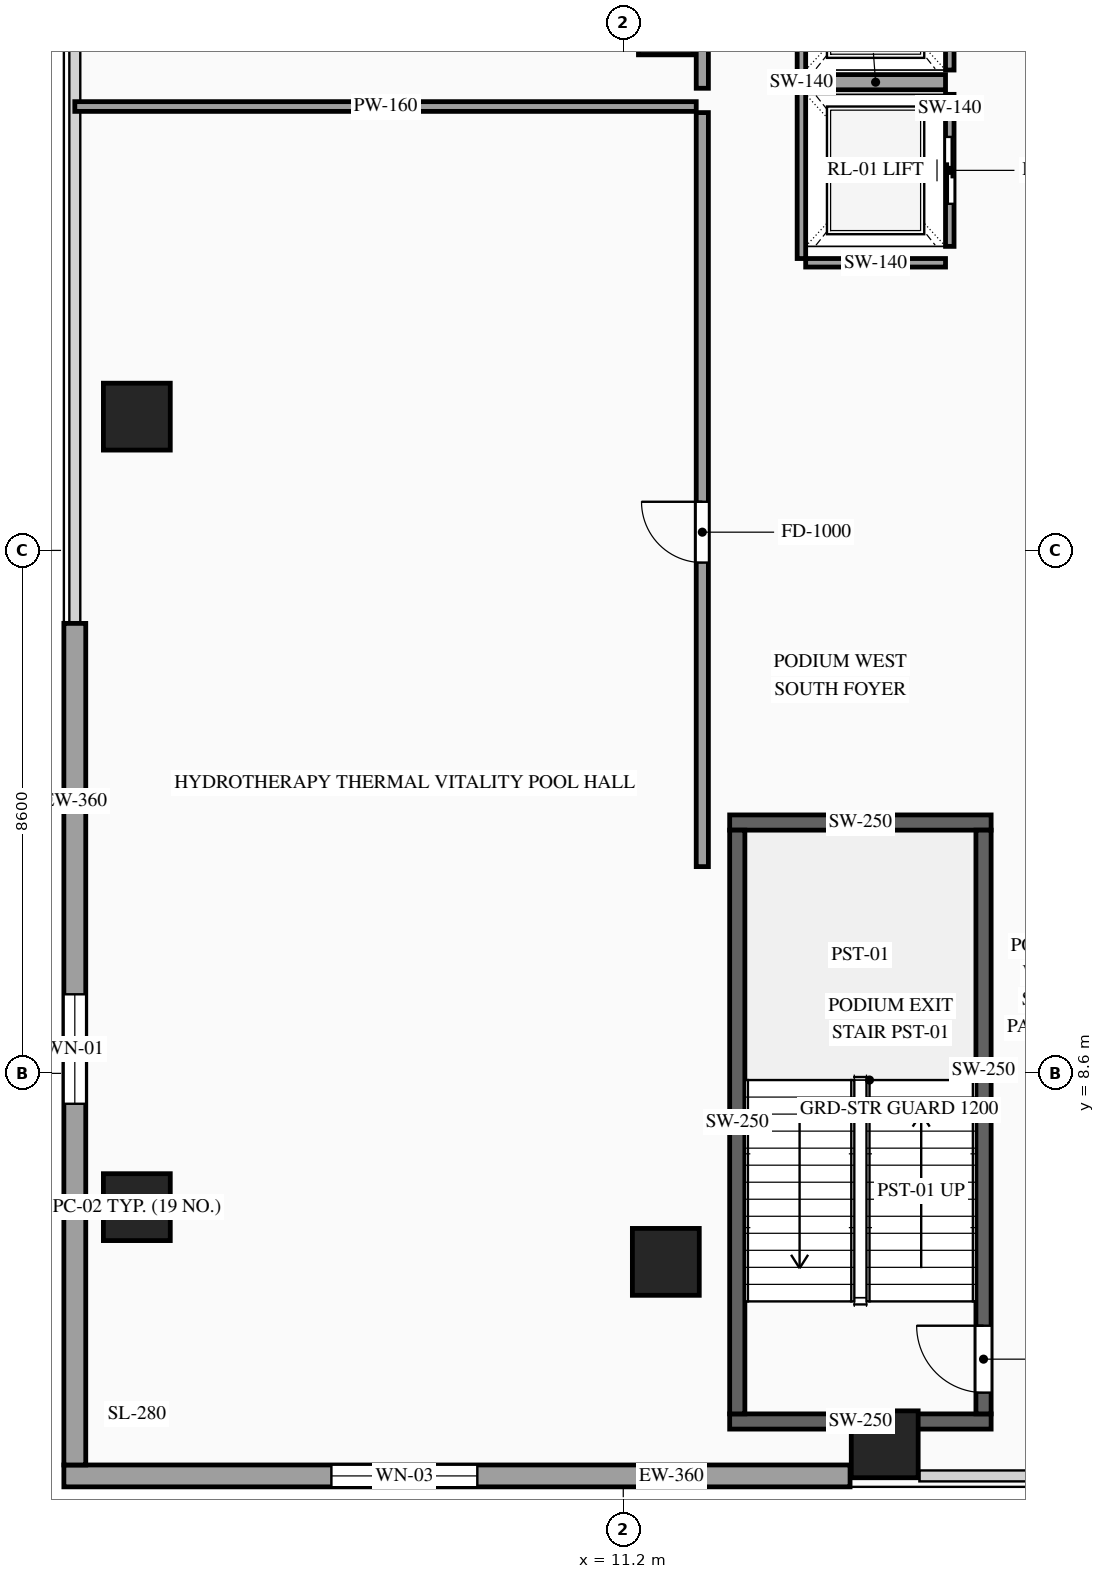
"""IFC4 building model, lengths in metres.
Left out: names, types, materials, properties, quantities, classifications, styles, units other than length and angle.
Written with IfcOpenShell. Run it as: python <this file> out.ifc"""

import sys

from ifc_helpers import new_model, si_unit, direction, frame, frame_2d, origin, origin_2d, place, context, subcontext, project, spatial, rectangle, extrude, source, transform, mapped, element, fill, save


model = new_model("IFC4")
c1 = context("Model", 3, precision=1e-05, world=origin(), true_north=direction((0.0, 1.0)))
c2 = subcontext(c1, "Body", "Model", "MODEL_VIEW")
j1 = project(units=[si_unit("LENGTHUNIT", "METRE"), si_unit("PLANEANGLEUNIT", "RADIAN")], contexts=[c1])
p1 = place(None, origin())
s1 = spatial("IfcSite", under=j1, at=p1, CompositionType="ELEMENT")
p2 = place(p1, origin())
s2 = spatial("IfcBuilding", under=s1, at=p2, CompositionType="ELEMENT")
p3 = place(p2, frame((0.0, 0.0, 15.0)))
s3 = spatial("IfcBuildingStorey", under=s2, at=p3, CompositionType="ELEMENT", Elevation=15.0)
m1 = source(origin(), c2, "Body", "SweptSolid", [
    extrude(rectangle(XDim=1.1, YDim=1.1, at=origin_2d()), origin(), (0.0, 0.0, 1.0), 4.8),
])
for number, where, z_axis, x_axis in (
    (1, (3.2, 6.4, 0.0), (0.0, 0.0, 1.0), (1.0, 0.0, 0.0)),
    (2, (3.2, 19.4, 0.0), (0.0, 0.0, 1.0), (1.0, 0.0, 0.0)),
    (3, (11.9, 5.5, 0.0), (0.0, 0.0, 1.0), (1.0, 0.0, 0.0)),
    (4, (15.5, 2.5, 0.0), (0.0, 0.0, 1.0), (1.0, 0.0, 0.0)),
):
    element("IfcColumn", number, at=place(p3, frame(where, z_axis=z_axis, x_axis=x_axis)), inside=s3, PredefinedType="COLUMN", context=c2, shape_type="MappedRepresentation", body=[
        mapped(m1, transform((0.0, 0.0, 0.0), scale=1.0)),
    ])
m2 = source(origin(), c2, "Body", "SweptSolid", [
    extrude(rectangle(XDim=0.9, YDim=0.9, at=origin_2d()), origin(), (0.0, 0.0, 1.0), 4.8),
])
p4 = place(p3, frame((11.9, 25.8, 0.0), z_axis=(0.0, 0.0, 1.0), x_axis=(1.0, 0.0, 0.0)))
e5 = element("IfcColumn", 5, at=p4, inside=s3, PredefinedType="COLUMN", context=c2, shape_type="MappedRepresentation", body=[
    mapped(m2, transform((0.0, 0.0, 0.0), scale=1.0)),
])
p5 = place(p3, frame((2.0, 1.98, 0.0), z_axis=(0.0, 0.0, 1.0), x_axis=(1.0, 0.0, 0.0)))
e6 = element("IfcWall", 6, at=p5, inside=s3, PredefinedType="SOLIDWALL", context=c2, shape_type="SweptSolid", body=[
    extrude(rectangle(XDim=12.93, YDim=0.36, at=frame_2d((6.465, 0.0))), origin(), (0.0, 0.0, 1.0), 4.52),
])
p6 = place(p5, frame((4.4, 0.0, 0.85)))
e7 = element("IfcOpeningElement", 7, at=p6, cuts=e6, PredefinedType="OPENING", context=c2, shape_type="SweptSolid", body=[
    extrude(rectangle(XDim=2.4, YDim=2.4, at=frame_2d((1.2, 1.2))), frame((0.0, 0.195, 0.0), z_axis=(0.0, -1.0, 0.0), x_axis=(1.0, 0.0, 0.0)), (0.0, 0.0, 1.0), 0.39),
])
p7 = place(p3, frame((2.18, 2.16, 0.0), z_axis=(0.0, 0.0, 1.0), x_axis=(0.0, 1.0, 0.0)))
e8 = element("IfcWall", 8, at=p7, inside=s3, PredefinedType="SOLIDWALL", context=c2, shape_type="SweptSolid", body=[
    extrude(rectangle(XDim=13.84, YDim=0.36, at=frame_2d((6.92, 0.0))), origin(), (0.0, 0.0, 1.0), 4.52),
])
p8 = place(p7, frame((5.94, 0.0, 0.9)))
e9 = element("IfcOpeningElement", 9, at=p8, cuts=e8, PredefinedType="OPENING", context=c2, shape_type="SweptSolid", body=[
    extrude(rectangle(XDim=1.8, YDim=2.2, at=frame_2d((0.9, 1.1))), frame((0.0, 0.195, 0.0), z_axis=(0.0, -1.0, 0.0), x_axis=(1.0, 0.0, 0.0)), (0.0, 0.0, 1.0), 0.39),
])
p9 = place(p3, frame((16.57, 22.2, 0.0), z_axis=(0.0, 0.0, 1.0), x_axis=(0.0, 1.0, 0.0)))
e10 = element("IfcWall", 10, at=p9, inside=s3, PredefinedType="SOLIDWALL", context=c2, shape_type="SweptSolid", body=[
    extrude(rectangle(XDim=2.5, YDim=0.14, at=frame_2d((1.25, 0.0))), origin(), (0.0, 0.0, 1.0), 4.52),
])
p10 = place(p9, frame((0.7, 0.0, 0.0)))
e11 = element("IfcOpeningElement", 11, at=p10, cuts=e10, PredefinedType="OPENING", context=c2, shape_type="SweptSolid", body=[
    extrude(rectangle(XDim=1.1, YDim=2.2, at=frame_2d((0.55, 1.1))), frame((0.0, 0.085, 0.0), z_axis=(0.0, -1.0, 0.0), x_axis=(1.0, 0.0, 0.0)), (0.0, 0.0, 1.0), 0.17),
])
m3 = source(origin(), c2, "Body", "SweptSolid", [
    extrude(rectangle(XDim=2.3, YDim=0.25, at=frame_2d((1.15, 0.0))), origin(), (0.0, 0.0, 1.0), 4.52),
])
p11 = place(p3, frame((14.2, 24.9, 0.0), z_axis=(0.0, 0.0, 1.0), x_axis=(1.0, 0.0, 0.0)))
e12 = element("IfcWall", 12, at=p11, inside=s3, PredefinedType="SOLIDWALL", context=c2, shape_type="MappedRepresentation", body=[
    mapped(m3, transform((0.0, 0.0, 0.0), scale=1.0)),
])
m4 = source(origin(), c2, "Body", "SweptSolid", [
    extrude(rectangle(XDim=5.8, YDim=0.14, at=frame_2d((2.9, 0.0))), origin(), (0.0, 0.0, 1.0), 4.52),
])
p12 = place(p3, frame((14.13, 22.0, 0.0), z_axis=(0.0, 0.0, 1.0), x_axis=(0.0, 1.0, 0.0)))
e13 = element("IfcWall", 13, at=p12, inside=s3, PredefinedType="SOLIDWALL", context=c2, shape_type="MappedRepresentation", body=[
    mapped(m4, transform((0.0, 0.0, 0.0), scale=1.0)),
])
m5 = source(origin(), c2, "Body", "SweptSolid", [
    extrude(rectangle(XDim=2.3, YDim=0.14, at=frame_2d((1.15, 0.0))), origin(), (0.0, 0.0, 1.0), 4.52),
])
p13 = place(p3, frame((14.2, 21.93, 0.0), z_axis=(0.0, 0.0, 1.0), x_axis=(1.0, 0.0, 0.0)))
e14 = element("IfcWall", 14, at=p13, inside=s3, PredefinedType="SOLIDWALL", context=c2, shape_type="MappedRepresentation", body=[
    mapped(m5, transform((0.0, 0.0, 0.0), scale=1.0)),
])
p14 = place(p3, frame((16.57, 25.1, 0.0), z_axis=(0.0, 0.0, 1.0), x_axis=(0.0, 1.0, 0.0)))
e15 = element("IfcWall", 15, at=p14, inside=s3, PredefinedType="SOLIDWALL", context=c2, shape_type="SweptSolid", body=[
    extrude(rectangle(XDim=2.5, YDim=0.14, at=frame_2d((1.25, 0.0))), origin(), (0.0, 0.0, 1.0), 4.52),
])
p15 = place(p14, frame((0.7, 0.0, 0.0)))
e16 = element("IfcOpeningElement", 16, at=p15, cuts=e15, PredefinedType="OPENING", context=c2, shape_type="SweptSolid", body=[
    extrude(rectangle(XDim=1.1, YDim=2.2, at=frame_2d((0.55, 1.1))), frame((0.0, 0.085, 0.0), z_axis=(0.0, -1.0, 0.0), x_axis=(1.0, 0.0, 0.0)), (0.0, 0.0, 1.0), 0.17),
])
m6 = source(origin(), c2, "Body", "SweptSolid", [
    extrude(rectangle(XDim=4.3, YDim=0.25, at=frame_2d((2.15, 0.0))), origin(), (0.0, 0.0, 1.0), 4.52),
])
for number, where, z_axis, x_axis in (
    (17, (12.95, 2.875, 0.0), (0.0, 0.0, 1.0), (1.0, 0.0, 0.0)),
    (18, (12.95, 12.725, 0.0), (0.0, 0.0, 1.0), (1.0, 0.0, 0.0)),
):
    element("IfcWall", number, at=place(p3, frame(where, z_axis=z_axis, x_axis=x_axis)), inside=s3, PredefinedType="SOLIDWALL", context=c2, shape_type="MappedRepresentation", body=[
        mapped(m6, transform((0.0, 0.0, 0.0), scale=1.0)),
    ])
m7 = source(origin(), c2, "Body", "SweptSolid", [
    extrude(rectangle(XDim=9.6, YDim=0.25, at=frame_2d((4.8, 0.0))), origin(), (0.0, 0.0, 1.0), 4.52),
])
p16 = place(p3, frame((13.075, 3.0, 0.0), z_axis=(0.0, 0.0, 1.0), x_axis=(0.0, 1.0, 0.0)))
e19 = element("IfcWall", 19, at=p16, inside=s3, PredefinedType="SOLIDWALL", context=c2, shape_type="MappedRepresentation", body=[
    mapped(m7, transform((0.0, 0.0, 0.0), scale=1.0)),
])
p17 = place(p3, frame((17.125, 3.0, 0.0), z_axis=(0.0, 0.0, 1.0), x_axis=(0.0, 1.0, 0.0)))
e20 = element("IfcWall", 20, at=p17, inside=s3, PredefinedType="SOLIDWALL", context=c2, shape_type="SweptSolid", body=[
    extrude(rectangle(XDim=9.6, YDim=0.25, at=frame_2d((4.8, 0.0))), origin(), (0.0, 0.0, 1.0), 4.52),
])
p18 = place(p17, frame((0.35, 0.0, 0.0)))
e21 = element("IfcOpeningElement", 21, at=p18, cuts=e20, PredefinedType="OPENING", context=c2, shape_type="SweptSolid", body=[
    extrude(rectangle(XDim=1.1, YDim=2.2, at=frame_2d((0.55, 1.1))), frame((0.0, 0.14, 0.0), z_axis=(0.0, -1.0, 0.0), x_axis=(1.0, 0.0, 0.0)), (0.0, 0.0, 1.0), 0.28),
])
p19 = place(p3, frame((12.5, 12.0, 0.0), z_axis=(0.0, 0.0, 1.0), x_axis=(0.0, 1.0, 0.0)))
e22 = element("IfcWall", 22, at=p19, inside=s3, PredefinedType="PARTITIONING", context=c2, shape_type="SweptSolid", body=[
    extrude(rectangle(XDim=12.4, YDim=0.2, at=frame_2d((6.2, 0.0))), origin(), (0.0, 0.0, 1.0), 4.52),
])
p20 = place(p19, frame((5.0, 0.0, 0.0)))
e23 = element("IfcOpeningElement", 23, at=p20, cuts=e22, PredefinedType="OPENING", context=c2, shape_type="SweptSolid", body=[
    extrude(rectangle(XDim=1.0, YDim=2.2, at=frame_2d((0.5, 1.1))), frame((0.0, 0.115, 0.0), z_axis=(0.0, -1.0, 0.0), x_axis=(1.0, 0.0, 0.0)), (0.0, 0.0, 1.0), 0.23),
])
m8 = source(origin(), c2, "Body", "SweptSolid", [
    extrude(rectangle(XDim=10.22, YDim=0.16, at=frame_2d((5.11, 0.0))), origin(), (0.0, 0.0, 1.0), 4.52),
])
p21 = place(p3, frame((2.18, 24.5, 0.0), z_axis=(0.0, 0.0, 1.0), x_axis=(1.0, 0.0, 0.0)))
e24 = element("IfcWall", 24, at=p21, inside=s3, PredefinedType="PARTITIONING", context=c2, shape_type="MappedRepresentation", body=[
    mapped(m8, transform((0.0, 0.0, 0.0), scale=1.0)),
])
p22 = place(p3, frame((12.5, 24.8, 0.0), z_axis=(0.0, 0.0, 1.0), x_axis=(0.0, 1.0, 0.0)))
e25 = element("IfcWall", 25, at=p22, inside=s3, PredefinedType="PARTITIONING", context=c2, shape_type="SweptSolid", body=[
    extrude(rectangle(XDim=24.82, YDim=0.2, at=frame_2d((12.41, 0.0))), origin(), (0.0, 0.0, 1.0), 4.52),
])
p23 = place(p22, frame((4.9, 0.0, 0.0)))
e26 = element("IfcOpeningElement", 26, at=p23, cuts=e25, PredefinedType="OPENING", context=c2, shape_type="SweptSolid", body=[
    extrude(rectangle(XDim=1.0, YDim=2.2, at=frame_2d((0.5, 1.1))), frame((0.0, 0.115, 0.0), z_axis=(0.0, -1.0, 0.0), x_axis=(1.0, 0.0, 0.0)), (0.0, 0.0, 1.0), 0.23),
])
m9 = source(origin(), c2, "Body", "SweptSolid", [
    extrude(rectangle(XDim=2.4, YDim=2.4, at=frame_2d((1.2, 1.2))), frame((0.0, 0.03, 0.0), z_axis=(0.0, -1.0, 0.0), x_axis=(1.0, 0.0, 0.0)), (0.0, 0.0, 1.0), 0.06),
])
p24 = place(p6, origin())
e27 = element("IfcWindow", 27, at=p24, inside=s3, PartitioningType="SINGLE_PANEL", PredefinedType="WINDOW", context=c2, shape_type="MappedRepresentation", body=[
    mapped(m9, transform((0.0, 0.0, 0.0), scale=1.0)),
])
fill(e7, e27)
m10 = source(origin(), c2, "Body", "SweptSolid", [
    extrude(rectangle(XDim=1.8, YDim=2.2, at=frame_2d((0.9, 1.1))), frame((0.0, 0.03, 0.0), z_axis=(0.0, -1.0, 0.0), x_axis=(1.0, 0.0, 0.0)), (0.0, 0.0, 1.0), 0.06),
])
p25 = place(p8, origin())
e28 = element("IfcWindow", 28, at=p25, inside=s3, PartitioningType="SINGLE_PANEL", PredefinedType="WINDOW", context=c2, shape_type="MappedRepresentation", body=[
    mapped(m10, transform((0.0, 0.0, 0.0), scale=1.0)),
])
fill(e9, e28)
m11 = source(origin(), c2, "Body", "SweptSolid", [
    extrude(rectangle(XDim=1.1, YDim=2.2, at=frame_2d((0.55, 1.1))), frame((0.0, 0.025, 0.0), z_axis=(0.0, -1.0, 0.0), x_axis=(1.0, 0.0, 0.0)), (0.0, 0.0, 1.0), 0.05),
])
p26 = place(p10, origin())
e29 = element("IfcDoor", 29, at=p26, inside=s3, OperationType="SLIDING_TO_RIGHT", PredefinedType="DOOR", context=c2, shape_type="MappedRepresentation", body=[
    mapped(m11, transform((0.0, 0.0, 0.0), scale=1.0)),
])
fill(e11, e29)
m12 = source(origin(), c2, "Body", "SweptSolid", [
    extrude(rectangle(XDim=1.1, YDim=2.2, at=frame_2d((0.55, 1.1))), frame((0.0, 0.025, 0.0), z_axis=(0.0, -1.0, 0.0), x_axis=(1.0, 0.0, 0.0)), (0.0, 0.0, 1.0), 0.05),
])
p27 = place(p18, origin())
e30 = element("IfcDoor", 30, at=p27, inside=s3, OperationType="SINGLE_SWING_RIGHT", PredefinedType="DOOR", context=c2, shape_type="MappedRepresentation", body=[
    mapped(m12, transform((0.0, 0.0, 0.0), scale=1.0)),
])
fill(e21, e30)
m13 = source(origin(), c2, "Body", "SweptSolid", [
    extrude(rectangle(XDim=1.0, YDim=2.2, at=frame_2d((0.5, 1.1))), frame((0.0, 0.025, 0.0), z_axis=(0.0, -1.0, 0.0), x_axis=(1.0, 0.0, 0.0)), (0.0, 0.0, 1.0), 0.05),
])
p28 = place(p20, origin())
e31 = element("IfcDoor", 31, at=p28, inside=s3, OperationType="SINGLE_SWING_RIGHT", PredefinedType="DOOR", context=c2, shape_type="MappedRepresentation", body=[
    mapped(m13, transform((0.0, 0.0, 0.0), scale=1.0)),
])
fill(e23, e31)
save(model, sys.argv[1])
